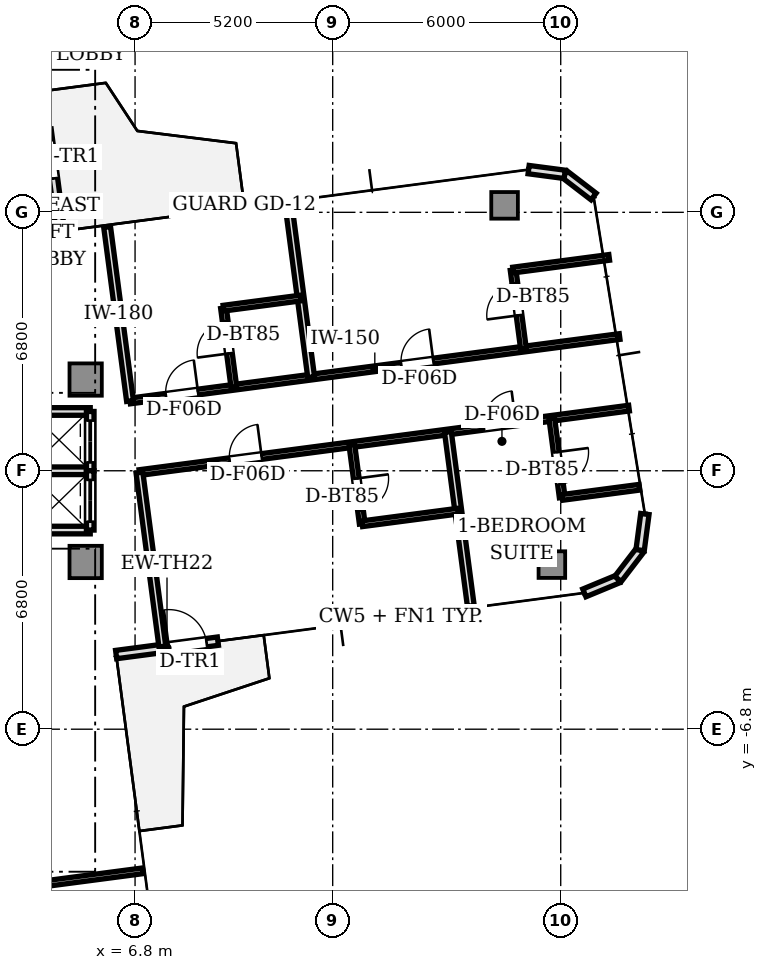
"""IFC4 building model, lengths in metres.
Left out: names, types, materials, properties, quantities, classifications, styles, units other than length and angle.
Written with IfcOpenShell. Run it as: python <this file> out.ifc"""

import sys

from ifc_helpers import new_model, si_unit, direction, frame, frame_2d, origin, origin_2d, place, context, subcontext, project, spatial, rectangle, extrude, source, transform, mapped, element, fill, save


model = new_model("IFC4")
c1 = context("Model", 3, precision=1e-05, world=origin(), true_north=direction((0.0, 1.0)))
c2 = subcontext(c1, "Body", "Model", "MODEL_VIEW")
j1 = project(units=[si_unit("LENGTHUNIT", "METRE"), si_unit("PLANEANGLEUNIT", "RADIAN")], contexts=[c1])
p1 = place(None, origin())
s1 = spatial("IfcSite", under=j1, at=p1, CompositionType="ELEMENT")
p2 = place(p1, origin())
s2 = spatial("IfcBuilding", under=s1, at=p2, CompositionType="ELEMENT")
p3 = place(p2, frame((0.0, 0.0, 244.5)))
s3 = spatial("IfcBuildingStorey", under=s2, at=p3, CompositionType="ELEMENT", Elevation=244.5)
m1 = source(origin(), c2, "Body", "SweptSolid", [
    extrude(rectangle(XDim=0.85, YDim=0.85, at=origin_2d()), origin(), (0.0, 0.0, 1.0), 3.11),
])
for number, where, z_axis, x_axis in (
    (1, (5.5, 2.4, 0.0), (0.0, 0.0, 1.0), (1.0, 0.0, 0.0)),
    (2, (5.5, -2.4, 0.0), (0.0, 0.0, 1.0), (1.0, 0.0, 0.0)),
):
    element("IfcColumn", number, at=place(p3, frame(where, z_axis=z_axis, x_axis=x_axis)), inside=s3, PredefinedType="COLUMN", context=c2, shape_type="MappedRepresentation", body=[
        mapped(m1, transform((0.0, 0.0, 0.0), scale=1.0)),
    ])
m2 = source(origin(), c2, "Body", "SweptSolid", [
    extrude(rectangle(XDim=0.7, YDim=0.7, at=origin_2d()), origin(), (0.0, 0.0, 1.0), 3.11),
])
for number, where, z_axis, x_axis in (
    (3, (17.767, -2.469, 0.0), (0.0, 0.0, 1.0), (1.0, 0.0, 0.0)),
    (4, (16.523, 6.983, 0.0), (0.0, 0.0, 1.0), (1.0, 0.0, 0.0)),
):
    element("IfcColumn", number, at=place(p3, frame(where, z_axis=z_axis, x_axis=x_axis)), inside=s3, PredefinedType="COLUMN", context=c2, shape_type="MappedRepresentation", body=[
        mapped(m2, transform((0.0, 0.0, 0.0), scale=1.0)),
    ])
p4 = place(p3, frame((6.302, -4.836, 0.0), z_axis=(0.0, 0.0, 1.0), x_axis=(0.991451525486, 0.130475563272, 0.0)))
e5 = element("IfcWall", 5, at=p4, inside=s3, PredefinedType="STANDARD", context=c2, shape_type="SweptSolid", body=[
    extrude(rectangle(XDim=2.7, YDim=0.22, at=frame_2d((1.35, 0.0))), origin(), (0.0, 0.0, 1.0), 3.11),
])
p5 = place(p4, frame((1.4, 0.0, 0.0)))
e6 = element("IfcOpeningElement", 6, at=p5, cuts=e5, PredefinedType="OPENING", context=c2, shape_type="SweptSolid", body=[
    extrude(rectangle(XDim=1.0, YDim=2.2, at=frame_2d((0.5, 1.1))), frame((0.0, 0.12, 0.0), z_axis=(0.0, -1.0, 0.0), x_axis=(1.0, 0.0, 0.0)), (0.0, 0.0, 1.0), 0.24),
])
for number, where, z_axis, x_axis in (
    (7, (18.622, -3.214, 0.0), (0.0, 0.0, 1.0), (0.924, 0.383, 0.0)),
    (8, (19.507, -2.847, 0.0), (0.0, 0.0, 1.0), (0.609, 0.793, 0.0)),
    (9, (20.09, -2.088, 0.0), (0.0, 0.0, 1.0), (0.131, 0.991, 0.0)),
    (10, (18.865, 7.216, 0.0), (0.0, 0.0, 1.0), (-0.793, 0.609, 0.0)),
    (11, (18.105, 7.799, 0.0), (0.0, 0.0, 1.0), (-0.991, 0.131, 0.0)),
):
    element("IfcWall", number, at=place(p3, frame(where, z_axis=z_axis, x_axis=x_axis)), inside=s3, PredefinedType="STANDARD", context=c2, shape_type="SweptSolid", body=[
        extrude(rectangle(XDim=0.958, YDim=0.22, at=frame_2d((0.479, 0.0))), origin(), (0.0, 0.0, 1.0), 3.11),
    ])
p6 = place(p3, frame((4.836, 6.302, 0.0), z_axis=(0.0, 0.0, 1.0), x_axis=(-0.130475563272, 0.991451525486, 0.0)))
e12 = element("IfcWall", 12, at=p6, inside=s3, PredefinedType="STANDARD", context=c2, shape_type="SweptSolid", body=[
    extrude(rectangle(XDim=2.7, YDim=0.22, at=frame_2d((1.35, 0.0))), origin(), (0.0, 0.0, 1.0), 3.11),
])
p7 = place(p6, frame((1.4, 0.0, 0.0)))
e13 = element("IfcOpeningElement", 13, at=p7, cuts=e12, PredefinedType="OPENING", context=c2, shape_type="SweptSolid", body=[
    extrude(rectangle(XDim=1.0, YDim=2.2, at=frame_2d((0.5, 1.1))), frame((0.0, 0.12, 0.0), z_axis=(0.0, -1.0, 0.0), x_axis=(1.0, 0.0, 0.0)), (0.0, 0.0, 1.0), 0.24),
])
for number, where, z_axis, x_axis in (
    (14, (3.98, 1.56, 0.0), (0.0, 0.0, 1.0), (1.0, 0.0, 0.0)),
    (15, (3.98, -1.56, 0.0), (0.0, 0.0, 1.0), (1.0, 0.0, 0.0)),
    (16, (3.98, 0.0, 0.0), (0.0, 0.0, 1.0), (1.0, 0.0, 0.0)),
):
    element("IfcWall", number, at=place(p3, frame(where, z_axis=z_axis, x_axis=x_axis)), inside=s3, PredefinedType="SOLIDWALL", context=c2, shape_type="SweptSolid", body=[
        extrude(rectangle(XDim=1.64, YDim=0.2, at=frame_2d((0.82, 0.0))), origin(), (0.0, 0.0, 1.0), 2.66),
    ])
p8 = place(p3, frame((5.62, 0.0, 0.0), z_axis=(0.0, 0.0, 1.0), x_axis=(0.0, 1.0, 0.0)))
e17 = element("IfcWall", 17, at=p8, inside=s3, PredefinedType="SOLIDWALL", context=c2, shape_type="SweptSolid", body=[
    extrude(rectangle(XDim=1.56, YDim=0.2, at=frame_2d((0.78, 0.0))), origin(), (0.0, 0.0, 1.0), 2.66),
])
p9 = place(p8, frame((0.22, 0.0, 0.0)))
e18 = element("IfcOpeningElement", 18, at=p9, cuts=e17, PredefinedType="OPENING", context=c2, shape_type="SweptSolid", body=[
    extrude(rectangle(XDim=1.1, YDim=2.2, at=frame_2d((0.55, 1.1))), frame((0.0, 0.11, 0.0), z_axis=(0.0, -1.0, 0.0), x_axis=(1.0, 0.0, 0.0)), (0.0, 0.0, 1.0), 0.22),
])
p10 = place(p3, frame((5.62, -1.56, 0.0), z_axis=(0.0, 0.0, 1.0), x_axis=(0.0, 1.0, 0.0)))
e19 = element("IfcWall", 19, at=p10, inside=s3, PredefinedType="SOLIDWALL", context=c2, shape_type="SweptSolid", body=[
    extrude(rectangle(XDim=1.56, YDim=0.2, at=frame_2d((0.78, 0.0))), origin(), (0.0, 0.0, 1.0), 2.66),
])
p11 = place(p10, frame((0.22, 0.0, 0.0)))
e20 = element("IfcOpeningElement", 20, at=p11, cuts=e19, PredefinedType="OPENING", context=c2, shape_type="SweptSolid", body=[
    extrude(rectangle(XDim=1.1, YDim=2.2, at=frame_2d((0.55, 1.1))), frame((0.0, 0.11, 0.0), z_axis=(0.0, -1.0, 0.0), x_axis=(1.0, 0.0, 0.0)), (0.0, 0.0, 1.0), 0.22),
])
p12 = place(p3, frame((6.667, 1.836, 0.0), z_axis=(0.0, 0.0, 1.0), x_axis=(0.991443675631, 0.130535198518, 0.0)))
e21 = element("IfcWall", 21, at=p12, inside=s3, PredefinedType="PARTITIONING", context=c2, shape_type="SweptSolid", body=[
    extrude(rectangle(XDim=12.993, YDim=0.15, at=frame_2d((6.497, 0.0))), origin(), (0.0, 0.0, 1.0), 2.66),
])
p13 = place(p12, frame((0.954, 0.0, 0.0)))
e22 = element("IfcOpeningElement", 22, at=p13, cuts=e21, PredefinedType="OPENING", context=c2, shape_type="SweptSolid", body=[
    extrude(rectangle(XDim=0.85, YDim=2.1, at=frame_2d((0.425, 1.05))), frame((0.0, 0.085, 0.0), z_axis=(0.0, -1.0, 0.0), x_axis=(1.0, 0.0, 0.0)), (0.0, 0.0, 1.0), 0.17),
])
p14 = place(p12, frame((7.2, 0.0, 0.0)))
e23 = element("IfcOpeningElement", 23, at=p14, cuts=e21, PredefinedType="OPENING", context=c2, shape_type="SweptSolid", body=[
    extrude(rectangle(XDim=0.85, YDim=2.1, at=frame_2d((0.425, 1.05))), frame((0.0, 0.085, 0.0), z_axis=(0.0, -1.0, 0.0), x_axis=(1.0, 0.0, 0.0)), (0.0, 0.0, 1.0), 0.17),
])
p15 = place(p3, frame((6.915, -0.048, 0.0), z_axis=(0.0, 0.0, 1.0), x_axis=(0.991443675631, 0.130535198518, 0.0)))
e24 = element("IfcWall", 24, at=p15, inside=s3, PredefinedType="PARTITIONING", context=c2, shape_type="SweptSolid", body=[
    extrude(rectangle(XDim=12.993, YDim=0.15, at=frame_2d((6.497, 0.0))), origin(), (0.0, 0.0, 1.0), 2.66),
])
p16 = place(p15, frame((2.393, 0.0, 0.0)))
e25 = element("IfcOpeningElement", 25, at=p16, cuts=e24, PredefinedType="OPENING", context=c2, shape_type="SweptSolid", body=[
    extrude(rectangle(XDim=0.85, YDim=2.1, at=frame_2d((0.425, 1.05))), frame((0.0, 0.085, 0.0), z_axis=(0.0, -1.0, 0.0), x_axis=(1.0, 0.0, 0.0)), (0.0, 0.0, 1.0), 0.17),
])
p17 = place(p15, frame((9.139, 0.0, 0.0)))
e26 = element("IfcOpeningElement", 26, at=p17, cuts=e24, PredefinedType="OPENING", context=c2, shape_type="SweptSolid", body=[
    extrude(rectangle(XDim=0.85, YDim=2.1, at=frame_2d((0.425, 1.05))), frame((0.0, 0.085, 0.0), z_axis=(0.0, -1.0, 0.0), x_axis=(1.0, 0.0, 0.0)), (0.0, 0.0, 1.0), 0.17),
])
p18 = place(p3, frame((6.667, 1.836, 0.0), z_axis=(0.0, 0.0, 1.0), x_axis=(-0.13055299465, 0.991441332398, 0.0)))
e27 = element("IfcWall", 27, at=p18, inside=s3, PredefinedType="PARTITIONING", context=c2, shape_type="SweptSolid", body=[
    extrude(rectangle(XDim=4.617, YDim=0.18, at=frame_2d((2.309, 0.0))), origin(), (0.0, 0.0, 1.0), 2.66),
])
p19 = place(p3, frame((7.518, -4.625, 0.0), z_axis=(0.0, 0.0, 1.0), x_axis=(-0.130559839157, 0.99144043109, 0.0)))
e28 = element("IfcWall", 28, at=p19, inside=s3, PredefinedType="PARTITIONING", context=c2, shape_type="SweptSolid", body=[
    extrude(rectangle(XDim=4.617, YDim=0.18, at=frame_2d((2.309, 0.0))), origin(), (0.0, 0.0, 1.0), 2.66),
])
p20 = place(p3, frame((11.433, 2.463, 0.0), z_axis=(0.0, 0.0, 1.0), x_axis=(-0.13055299465, 0.991441332398, 0.0)))
e29 = element("IfcWall", 29, at=p20, inside=s3, PredefinedType="PARTITIONING", context=c2, shape_type="SweptSolid", body=[
    extrude(rectangle(XDim=4.617, YDim=0.18, at=frame_2d((2.309, 0.0))), origin(), (0.0, 0.0, 1.0), 2.66),
])
p21 = place(p3, frame((9.401, 2.196, 0.0), z_axis=(0.0, 0.0, 1.0), x_axis=(-0.130556761174, 0.991440836415, 0.0)))
e30 = element("IfcWall", 30, at=p21, inside=s3, PredefinedType="PARTITIONING", context=c2, shape_type="SweptSolid", body=[
    extrude(rectangle(XDim=2.1, YDim=0.15, at=frame_2d((1.05, 0.0))), origin(), (0.0, 0.0, 1.0), 2.66),
])
p22 = place(p21, frame((0.9, 0.0, 0.0)))
e31 = element("IfcOpeningElement", 31, at=p22, cuts=e30, PredefinedType="OPENING", context=c2, shape_type="SweptSolid", body=[
    extrude(rectangle(XDim=0.85, YDim=2.1, at=frame_2d((0.425, 1.05))), frame((0.0, 0.085, 0.0), z_axis=(0.0, -1.0, 0.0), x_axis=(1.0, 0.0, 0.0)), (0.0, 0.0, 1.0), 0.17),
])
p23 = place(p3, frame((9.127, 4.278, 0.0), z_axis=(0.0, 0.0, 1.0), x_axis=(0.991444969909, 0.13052536781, 0.0)))
e32 = element("IfcWall", 32, at=p23, inside=s3, PredefinedType="PARTITIONING", context=c2, shape_type="SweptSolid", body=[
    extrude(rectangle(XDim=2.05, YDim=0.15, at=frame_2d((1.025, 0.0))), origin(), (0.0, 0.0, 1.0), 2.66),
])
p24 = place(p3, frame((17.021, 3.199, 0.0), z_axis=(0.0, 0.0, 1.0), x_axis=(-0.130457520295, 0.991453899785, 0.0)))
e33 = element("IfcWall", 33, at=p24, inside=s3, PredefinedType="PARTITIONING", context=c2, shape_type="SweptSolid", body=[
    extrude(rectangle(XDim=2.1, YDim=0.15, at=frame_2d((1.05, 0.0))), origin(), (0.0, 0.0, 1.0), 2.63),
])
p25 = place(p24, frame((0.9, 0.0, 0.0)))
e34 = element("IfcOpeningElement", 34, at=p25, cuts=e33, PredefinedType="OPENING", context=c2, shape_type="SweptSolid", body=[
    extrude(rectangle(XDim=0.85, YDim=2.1, at=frame_2d((0.425, 1.05))), frame((0.0, 0.085, 0.0), z_axis=(0.0, -1.0, 0.0), x_axis=(1.0, 0.0, 0.0)), (0.0, 0.0, 1.0), 0.17),
])
p26 = place(p3, frame((16.747, 5.281, 0.0), z_axis=(0.0, 0.0, 1.0), x_axis=(0.99143571012, 0.130595684076, 0.0)))
e35 = element("IfcWall", 35, at=p26, inside=s3, PredefinedType="PARTITIONING", context=c2, shape_type="SweptSolid", body=[
    extrude(rectangle(XDim=2.55, YDim=0.15, at=frame_2d((1.275, 0.0))), origin(), (0.0, 0.0, 1.0), 2.66),
])
p27 = place(p3, frame((15.031, 1.021, 0.0), z_axis=(0.0, 0.0, 1.0), x_axis=(0.130501018479, -0.991448175235, 0.0)))
e36 = element("IfcWall", 36, at=p27, inside=s3, PredefinedType="PARTITIONING", context=c2, shape_type="SweptSolid", body=[
    extrude(rectangle(XDim=4.617, YDim=0.18, at=frame_2d((2.309, 0.0))), origin(), (0.0, 0.0, 1.0), 2.66),
])
p28 = place(p3, frame((12.503, 0.688, 0.0), z_axis=(0.0, 0.0, 1.0), x_axis=(0.130541714651, -0.991442817683, 0.0)))
e37 = element("IfcWall", 37, at=p28, inside=s3, PredefinedType="PARTITIONING", context=c2, shape_type="SweptSolid", body=[
    extrude(rectangle(XDim=2.1, YDim=0.15, at=frame_2d((1.05, 0.0))), origin(), (0.0, 0.0, 1.0), 2.66),
])
p29 = place(p28, frame((0.9, 0.0, 0.0)))
e38 = element("IfcOpeningElement", 38, at=p29, cuts=e37, PredefinedType="OPENING", context=c2, shape_type="SweptSolid", body=[
    extrude(rectangle(XDim=0.85, YDim=2.1, at=frame_2d((0.425, 1.05))), frame((0.0, 0.085, 0.0), z_axis=(0.0, -1.0, 0.0), x_axis=(1.0, 0.0, 0.0)), (0.0, 0.0, 1.0), 0.17),
])
p30 = place(p3, frame((12.777, -1.394, 0.0), z_axis=(0.0, 0.0, 1.0), x_axis=(0.99143571012, 0.130595684076, 0.0)))
e39 = element("IfcWall", 39, at=p30, inside=s3, PredefinedType="PARTITIONING", context=c2, shape_type="SweptSolid", body=[
    extrude(rectangle(XDim=2.55, YDim=0.15, at=frame_2d((1.275, 0.0))), origin(), (0.0, 0.0, 1.0), 2.66),
])
p31 = place(p3, frame((17.765, 1.381, 0.0), z_axis=(0.0, 0.0, 1.0), x_axis=(0.13044248305, -0.9914558783, 0.0)))
e40 = element("IfcWall", 40, at=p31, inside=s3, PredefinedType="PARTITIONING", context=c2, shape_type="SweptSolid", body=[
    extrude(rectangle(XDim=2.1, YDim=0.15, at=frame_2d((1.05, 0.0))), origin(), (0.0, 0.0, 1.0), 2.66),
])
p32 = place(p31, frame((0.9, 0.0, 0.0)))
e41 = element("IfcOpeningElement", 41, at=p32, cuts=e40, PredefinedType="OPENING", context=c2, shape_type="SweptSolid", body=[
    extrude(rectangle(XDim=0.85, YDim=2.1, at=frame_2d((0.425, 1.05))), frame((0.0, 0.085, 0.0), z_axis=(0.0, -1.0, 0.0), x_axis=(1.0, 0.0, 0.0)), (0.0, 0.0, 1.0), 0.17),
])
p33 = place(p3, frame((18.039, -0.701, 0.0), z_axis=(0.0, 0.0, 1.0), x_axis=(0.991444969909, 0.13052536781, 0.0)))
e42 = element("IfcWall", 42, at=p33, inside=s3, PredefinedType="PARTITIONING", context=c2, shape_type="SweptSolid", body=[
    extrude(rectangle(XDim=2.05, YDim=0.15, at=frame_2d((1.025, 0.0))), origin(), (0.0, 0.0, 1.0), 2.66),
])
p34 = place(p3, frame((-4.038, -11.979, 0.0), z_axis=(0.0, 0.0, 1.0), x_axis=(0.991446382373, 0.130514638561, 0.0)))
e43 = element("IfcWall", 43, at=p34, inside=s3, PredefinedType="PARTITIONING", context=c2, shape_type="SweptSolid", body=[
    extrude(rectangle(XDim=11.134, YDim=0.15, at=frame_2d((5.567, 0.0))), origin(), (0.0, 0.0, 1.0), 2.66),
])
p35 = place(p34, frame((4.767, 0.0, 0.0)))
e44 = element("IfcOpeningElement", 44, at=p35, cuts=e43, PredefinedType="OPENING", context=c2, shape_type="SweptSolid", body=[
    extrude(rectangle(XDim=1.6, YDim=2.25, at=frame_2d((0.8, 1.125))), frame((0.0, 0.085, 0.0), z_axis=(0.0, -1.0, 0.0), x_axis=(1.0, 0.0, 0.0)), (0.0, 0.0, 1.0), 0.17),
])
m3 = source(origin(), c2, "Body", "SweptSolid", [
    extrude(rectangle(XDim=1.0, YDim=0.05, at=origin_2d()), origin(), (0.0, 0.0, 1.0), 2.2),
])
p36 = place(p5, frame((0.5, 0.0, 0.0)))
e45 = element("IfcDoor", 45, at=p36, inside=s3, OperationType="SINGLE_SWING_LEFT", PredefinedType="DOOR", context=c2, shape_type="MappedRepresentation", body=[
    mapped(m3, transform((0.0, 0.0, 0.0), scale=1.0)),
])
fill(e6, e45)
p37 = place(p7, frame((0.5, 0.0, 0.0)))
e46 = element("IfcDoor", 46, at=p37, inside=s3, OperationType="SINGLE_SWING_LEFT", PredefinedType="DOOR", context=c2, shape_type="MappedRepresentation", body=[
    mapped(m3, transform((0.0, 0.0, 0.0), scale=1.0)),
])
fill(e13, e46)
m4 = source(origin(), c2, "Body", "SweptSolid", [
    extrude(rectangle(XDim=1.1, YDim=0.05, at=origin_2d()), origin(), (0.0, 0.0, 1.0), 2.2),
])
p38 = place(p9, frame((0.55, 0.0, 0.0)))
e47 = element("IfcDoor", 47, at=p38, inside=s3, OperationType="DOUBLE_DOOR_SLIDING", PredefinedType="DOOR", context=c2, shape_type="MappedRepresentation", body=[
    mapped(m4, transform((0.0, 0.0, 0.0), scale=1.0)),
])
fill(e18, e47)
p39 = place(p11, frame((0.55, 0.0, 0.0)))
e48 = element("IfcDoor", 48, at=p39, inside=s3, OperationType="DOUBLE_DOOR_SLIDING", PredefinedType="DOOR", context=c2, shape_type="MappedRepresentation", body=[
    mapped(m4, transform((0.0, 0.0, 0.0), scale=1.0)),
])
fill(e20, e48)
m5 = source(origin(), c2, "Body", "SweptSolid", [
    extrude(rectangle(XDim=0.85, YDim=0.05, at=origin_2d()), origin(), (0.0, 0.0, 1.0), 2.1),
])
p40 = place(p22, frame((0.425, 0.0, 0.0)))
e49 = element("IfcDoor", 49, at=p40, inside=s3, OperationType="SINGLE_SWING_LEFT", PredefinedType="DOOR", context=c2, shape_type="MappedRepresentation", body=[
    mapped(m5, transform((0.0, 0.0, 0.0), scale=1.0)),
])
fill(e31, e49)
p41 = place(p13, frame((0.425, 0.0, 0.0)))
e50 = element("IfcDoor", 50, at=p41, inside=s3, OperationType="SINGLE_SWING_RIGHT", PredefinedType="DOOR", context=c2, shape_type="MappedRepresentation", body=[
    mapped(m5, transform((0.0, 0.0, 0.0), scale=1.0)),
])
fill(e22, e50)
p42 = place(p25, frame((0.425, 0.0, 0.0)))
e51 = element("IfcDoor", 51, at=p42, inside=s3, OperationType="SINGLE_SWING_LEFT", PredefinedType="DOOR", context=c2, shape_type="MappedRepresentation", body=[
    mapped(m5, transform((0.0, 0.0, 0.0), scale=1.0)),
])
fill(e34, e51)
p43 = place(p14, frame((0.425, 0.0, 0.0)))
e52 = element("IfcDoor", 52, at=p43, inside=s3, OperationType="SINGLE_SWING_RIGHT", PredefinedType="DOOR", context=c2, shape_type="MappedRepresentation", body=[
    mapped(m5, transform((0.0, 0.0, 0.0), scale=1.0)),
])
fill(e23, e52)
p44 = place(p29, frame((0.425, 0.0, 0.0)))
e53 = element("IfcDoor", 53, at=p44, inside=s3, OperationType="SINGLE_SWING_LEFT", PredefinedType="DOOR", context=c2, shape_type="MappedRepresentation", body=[
    mapped(m5, transform((0.0, 0.0, 0.0), scale=1.0)),
])
fill(e38, e53)
p45 = place(p16, frame((0.425, 0.0, 0.0)))
e54 = element("IfcDoor", 54, at=p45, inside=s3, OperationType="SINGLE_SWING_RIGHT", PredefinedType="DOOR", context=c2, shape_type="MappedRepresentation", body=[
    mapped(m5, transform((0.0, 0.0, 0.0), scale=1.0)),
])
fill(e25, e54)
p46 = place(p32, frame((0.425, 0.0, 0.0)))
e55 = element("IfcDoor", 55, at=p46, inside=s3, OperationType="SINGLE_SWING_LEFT", PredefinedType="DOOR", context=c2, shape_type="MappedRepresentation", body=[
    mapped(m5, transform((0.0, 0.0, 0.0), scale=1.0)),
])
fill(e41, e55)
p47 = place(p17, frame((0.425, 0.0, 0.0)))
e56 = element("IfcDoor", 56, at=p47, inside=s3, OperationType="SINGLE_SWING_RIGHT", PredefinedType="DOOR", context=c2, shape_type="MappedRepresentation", body=[
    mapped(m5, transform((0.0, 0.0, 0.0), scale=1.0)),
])
fill(e26, e56)
save(model, sys.argv[1])
